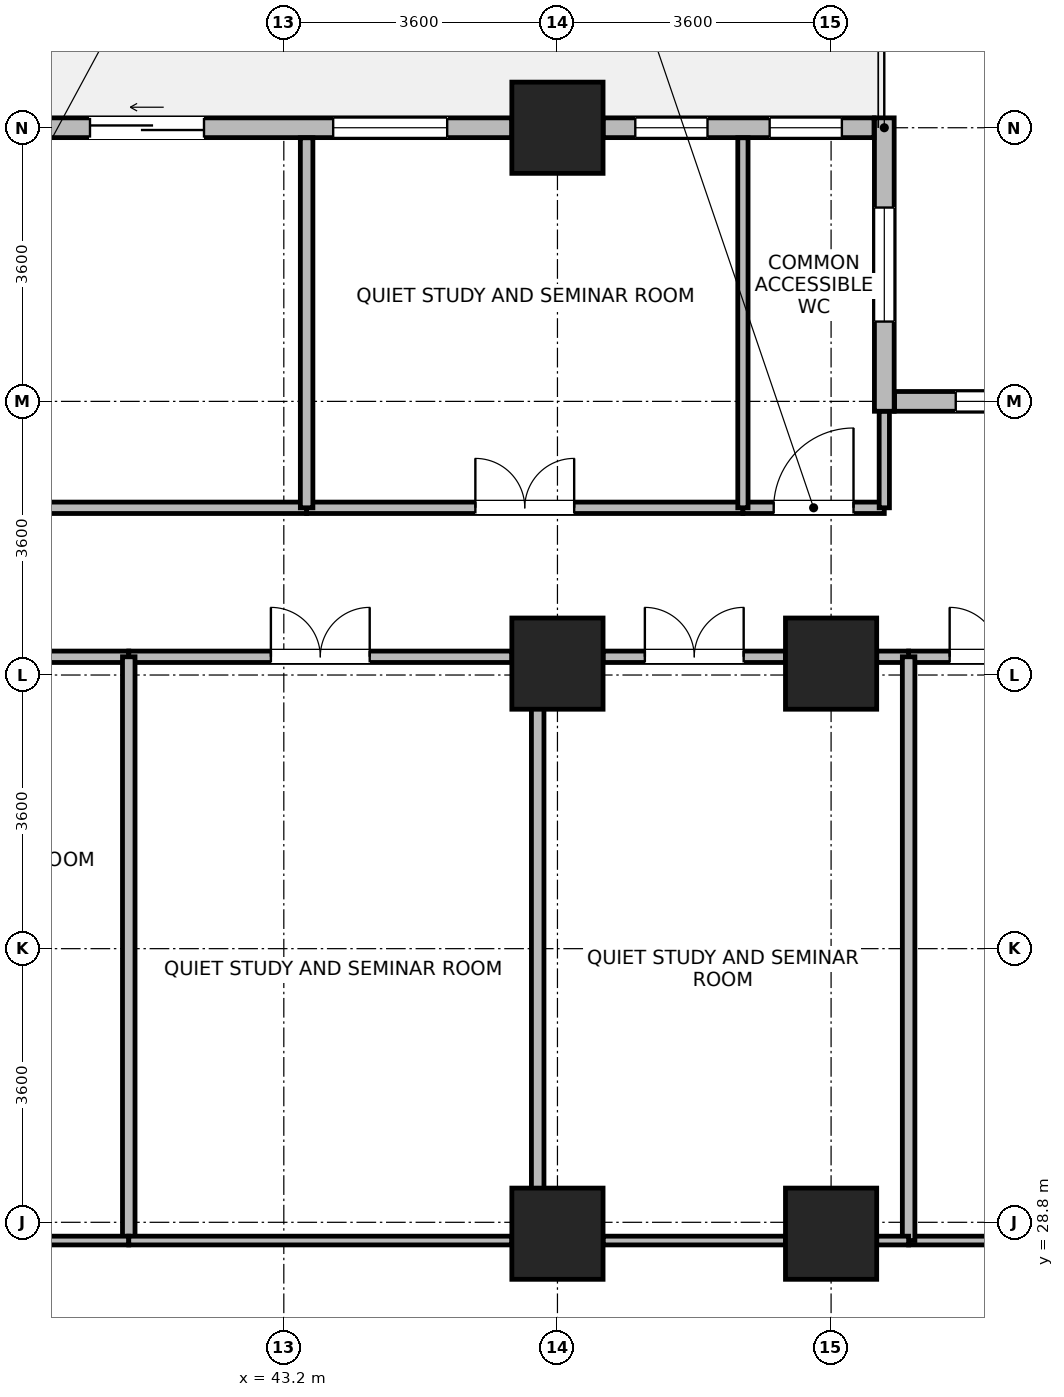
"""IFC4 building model, lengths in metres.
Left out: names, types, materials, properties, quantities, classifications, styles, units other than length and angle.
Written with IfcOpenShell. Run it as: python <this file> out.ifc"""

import sys

from ifc_helpers import new_model, si_unit, direction, frame, frame_2d, origin, origin_2d, place, context, subcontext, project, spatial, rectangle, extrude, source, transform, mapped, element, fill, save


model = new_model("IFC4")
c1 = context("Model", 3, precision=1e-05, world=origin(), true_north=direction((0.0, 1.0)))
c2 = subcontext(c1, "Body", "Model", "MODEL_VIEW")
j1 = project(units=[si_unit("LENGTHUNIT", "METRE"), si_unit("PLANEANGLEUNIT", "RADIAN")], contexts=[c1])
p1 = place(None, origin())
s1 = spatial("IfcSite", under=j1, at=p1, CompositionType="ELEMENT")
p2 = place(p1, origin())
s2 = spatial("IfcBuilding", under=s1, at=p2, CompositionType="ELEMENT")
p3 = place(p2, frame((0.0, 0.0, 115.6)))
s3 = spatial("IfcBuildingStorey", under=s2, at=p3, CompositionType="ELEMENT", Elevation=115.6)
m1 = source(origin(), c2, "Body", "SweptSolid", [
    extrude(rectangle(XDim=1.2, YDim=1.2, at=origin_2d()), origin(), (0.0, 0.0, 1.0), 3.7),
])
for number, where, z_axis, x_axis in (
    (1, (46.8, 28.65, 0.0), (0.0, 0.0, 1.0), (1.0, 0.0, 0.0)),
    (2, (46.8, 36.15, 0.0), (0.0, 0.0, 1.0), (1.0, 0.0, 0.0)),
    (3, (46.8, 43.2, 0.0), (0.0, 0.0, 1.0), (1.0, 0.0, 0.0)),
    (4, (50.4, 28.65, 0.0), (0.0, 0.0, 1.0), (1.0, 0.0, 0.0)),
    (5, (50.4, 36.15, 0.0), (0.0, 0.0, 1.0), (1.0, 0.0, 0.0)),
):
    element("IfcColumn", number, at=place(p3, frame(where, z_axis=z_axis, x_axis=x_axis)), inside=s3, PredefinedType="COLUMN", context=c2, shape_type="MappedRepresentation", body=[
        mapped(m1, transform((0.0, 0.0, 0.0), x_axis=(1.0, 0.0, 0.0), y_axis=(0.0, 1.0, 0.0), z_axis=(0.0, 0.0, 1.0), scale=1.0)),
    ])
p4 = place(p3, frame((51.235, 39.6, 0.0), z_axis=(0.0, 0.0, 1.0), x_axis=(1.0, 0.0, 0.0)))
e6 = element("IfcWall", 6, at=p4, inside=s3, PredefinedType="STANDARD", context=c2, shape_type="SweptSolid", body=[
    extrude(rectangle(XDim=9.33, YDim=0.26, at=frame_2d((4.665, 0.0))), origin(), (0.0, 0.0, 1.0), 3.43),
])
p5 = place(p4, frame((0.805, 0.0, 0.85)))
e7 = element("IfcOpeningElement", 7, at=p5, cuts=e6, PredefinedType="OPENING", context=c2, shape_type="SweptSolid", body=[
    extrude(rectangle(XDim=1.5, YDim=1.85, at=frame_2d((0.75, 0.925))), frame((0.0, 0.14, 0.0), z_axis=(0.0, -1.0, 0.0), x_axis=(1.0, 0.0, 0.0)), (0.0, 0.0, 1.0), 0.28),
])
p6 = place(p4, frame((3.915, 0.0, 0.85)))
e8 = element("IfcOpeningElement", 8, at=p6, cuts=e6, PredefinedType="OPENING", context=c2, shape_type="SweptSolid", body=[
    extrude(rectangle(XDim=1.5, YDim=1.85, at=frame_2d((0.75, 0.925))), frame((0.0, 0.14, 0.0), z_axis=(0.0, -1.0, 0.0), x_axis=(1.0, 0.0, 0.0)), (0.0, 0.0, 1.0), 0.28),
])
p7 = place(p4, frame((7.025, 0.0, 0.85)))
e9 = element("IfcOpeningElement", 9, at=p7, cuts=e6, PredefinedType="OPENING", context=c2, shape_type="SweptSolid", body=[
    extrude(rectangle(XDim=1.5, YDim=1.85, at=frame_2d((0.75, 0.925))), frame((0.0, 0.14, 0.0), z_axis=(0.0, -1.0, 0.0), x_axis=(1.0, 0.0, 0.0)), (0.0, 0.0, 1.0), 0.28),
])
p8 = place(p3, frame((51.1, 43.33, 0.0), z_axis=(0.0, 0.0, 1.0), x_axis=(0.0, -1.0, 0.0)))
e10 = element("IfcWall", 10, at=p8, inside=s3, PredefinedType="STANDARD", context=c2, shape_type="SweptSolid", body=[
    extrude(rectangle(XDim=3.86, YDim=0.26, at=frame_2d((1.93, 0.0))), origin(), (0.0, 0.0, 1.0), 3.43),
])
p9 = place(p8, frame((1.18, 0.0, 0.85)))
e11 = element("IfcOpeningElement", 11, at=p9, cuts=e10, PredefinedType="OPENING", context=c2, shape_type="SweptSolid", body=[
    extrude(rectangle(XDim=1.5, YDim=1.85, at=frame_2d((0.75, 0.925))), frame((0.0, 0.14, 0.0), z_axis=(0.0, -1.0, 0.0), x_axis=(1.0, 0.0, 0.0)), (0.0, 0.0, 1.0), 0.28),
])
p10 = place(p3, frame((47.401, 43.2, 0.0), z_axis=(0.0, 0.0, 1.0), x_axis=(1.0, 0.0, 0.0)))
e12 = element("IfcWall", 12, at=p10, inside=s3, PredefinedType="STANDARD", context=c2, shape_type="SweptSolid", body=[
    extrude(rectangle(XDim=3.564, YDim=0.26, at=frame_2d((1.782, 0.0))), origin(), (0.0, 0.0, 1.0), 3.43),
])
p11 = place(p10, frame((0.423, 0.0, 0.85)))
e13 = element("IfcOpeningElement", 13, at=p11, cuts=e12, PredefinedType="OPENING", context=c2, shape_type="SweptSolid", body=[
    extrude(rectangle(XDim=0.95, YDim=1.75, at=frame_2d((0.475, 0.875))), frame((0.0, 0.14, 0.0), z_axis=(0.0, -1.0, 0.0), x_axis=(1.0, 0.0, 0.0)), (0.0, 0.0, 1.0), 0.28),
])
p12 = place(p10, frame((2.191, 0.0, 0.85)))
e14 = element("IfcOpeningElement", 14, at=p12, cuts=e12, PredefinedType="OPENING", context=c2, shape_type="SweptSolid", body=[
    extrude(rectangle(XDim=0.95, YDim=1.75, at=frame_2d((0.475, 0.875))), frame((0.0, 0.14, 0.0), z_axis=(0.0, -1.0, 0.0), x_axis=(1.0, 0.0, 0.0)), (0.0, 0.0, 1.0), 0.28),
])
p13 = place(p3, frame((36.601, 43.2, 0.0), z_axis=(0.0, 0.0, 1.0), x_axis=(1.0, 0.0, 0.0)))
e15 = element("IfcWall", 15, at=p13, inside=s3, PredefinedType="STANDARD", context=c2, shape_type="SweptSolid", body=[
    extrude(rectangle(XDim=9.598, YDim=0.26, at=frame_2d((4.799, 0.0))), origin(), (0.0, 0.0, 1.0), 2.98),
])
p14 = place(p13, frame((4.049, 0.0, 0.0)))
e16 = element("IfcOpeningElement", 16, at=p14, cuts=e15, PredefinedType="OPENING", context=c2, shape_type="SweptSolid", body=[
    extrude(rectangle(XDim=1.5, YDim=2.15, at=frame_2d((0.75, 1.075))), frame((0.0, 0.14, 0.0), z_axis=(0.0, -1.0, 0.0), x_axis=(1.0, 0.0, 0.0)), (0.0, 0.0, 1.0), 0.28),
])
p15 = place(p13, frame((0.85, 0.0, 0.85)))
e17 = element("IfcOpeningElement", 17, at=p15, cuts=e15, PredefinedType="OPENING", context=c2, shape_type="SweptSolid", body=[
    extrude(rectangle(XDim=1.5, YDim=1.85, at=frame_2d((0.75, 0.925))), frame((0.0, 0.14, 0.0), z_axis=(0.0, -1.0, 0.0), x_axis=(1.0, 0.0, 0.0)), (0.0, 0.0, 1.0), 0.28),
])
p16 = place(p13, frame((7.248, 0.0, 0.85)))
e18 = element("IfcOpeningElement", 18, at=p16, cuts=e15, PredefinedType="OPENING", context=c2, shape_type="SweptSolid", body=[
    extrude(rectangle(XDim=1.5, YDim=1.85, at=frame_2d((0.75, 0.925))), frame((0.0, 0.14, 0.0), z_axis=(0.0, -1.0, 0.0), x_axis=(1.0, 0.0, 0.0)), (0.0, 0.0, 1.0), 0.28),
])
p17 = place(p3, frame((51.42, 36.24, 0.0), z_axis=(0.0, 0.0, 1.0), x_axis=(1.0, 0.0, 0.0)))
e19 = element("IfcWall", 19, at=p17, inside=s3, PredefinedType="PARTITIONING", context=c2, shape_type="SweptSolid", body=[
    extrude(rectangle(XDim=2.38, YDim=0.15, at=frame_2d((1.19, 0.0))), origin(), (0.0, 0.0, 1.0), 2.78),
])
p18 = place(p17, frame((0.54, 0.0, 0.0)))
e20 = element("IfcOpeningElement", 20, at=p18, cuts=e19, PredefinedType="OPENING", context=c2, shape_type="SweptSolid", body=[
    extrude(rectangle(XDim=1.3, YDim=2.12, at=frame_2d((0.65, 1.06))), frame((0.0, 0.085, 0.0), z_axis=(0.0, -1.0, 0.0), x_axis=(1.0, 0.0, 0.0)), (0.0, 0.0, 1.0), 0.17),
])
p19 = place(p3, frame((34.8, 38.2, 0.0), z_axis=(0.0, 0.0, 1.0), x_axis=(1.0, 0.0, 0.0)))
e21 = element("IfcWall", 21, at=p19, inside=s3, PredefinedType="PARTITIONING", context=c2, shape_type="SweptSolid", body=[
    extrude(rectangle(XDim=8.7, YDim=0.15, at=frame_2d((4.35, 0.0))), origin(), (0.0, 0.0, 1.0), 3.43),
])
p20 = place(p19, frame((3.9, 0.0, 0.0)))
e22 = element("IfcOpeningElement", 22, at=p20, cuts=e21, PredefinedType="OPENING", context=c2, shape_type="SweptSolid", body=[
    extrude(rectangle(XDim=0.9, YDim=2.08, at=frame_2d((0.45, 1.04))), frame((0.0, 0.085, 0.0), z_axis=(0.0, -1.0, 0.0), x_axis=(1.0, 0.0, 0.0)), (0.0, 0.0, 1.0), 0.17),
])
p21 = place(p3, frame((36.6, 36.24, 0.0), z_axis=(0.0, 0.0, 1.0), x_axis=(1.0, 0.0, 0.0)))
e23 = element("IfcWall", 23, at=p21, inside=s3, PredefinedType="PARTITIONING", context=c2, shape_type="SweptSolid", body=[
    extrude(rectangle(XDim=4.56, YDim=0.15, at=frame_2d((2.28, 0.0))), origin(), (0.0, 0.0, 1.0), 2.78),
])
p22 = place(p3, frame((43.5, 38.2, 0.0), z_axis=(0.0, 0.0, 1.0), x_axis=(1.0, 0.0, 0.0)))
e24 = element("IfcWall", 24, at=p22, inside=s3, PredefinedType="PARTITIONING", context=c2, shape_type="SweptSolid", body=[
    extrude(rectangle(XDim=5.74, YDim=0.15, at=frame_2d((2.87, 0.0))), origin(), (0.0, 0.0, 1.0), 3.43),
])
p23 = place(p22, frame((2.22, 0.0, 0.0)))
e25 = element("IfcOpeningElement", 25, at=p23, cuts=e24, PredefinedType="OPENING", context=c2, shape_type="SweptSolid", body=[
    extrude(rectangle(XDim=1.3, YDim=2.12, at=frame_2d((0.65, 1.06))), frame((0.0, 0.085, 0.0), z_axis=(0.0, -1.0, 0.0), x_axis=(1.0, 0.0, 0.0)), (0.0, 0.0, 1.0), 0.17),
])
p24 = place(p3, frame((41.16, 36.24, 0.0), z_axis=(0.0, 0.0, 1.0), x_axis=(1.0, 0.0, 0.0)))
e26 = element("IfcWall", 26, at=p24, inside=s3, PredefinedType="PARTITIONING", context=c2, shape_type="SweptSolid", body=[
    extrude(rectangle(XDim=5.04, YDim=0.15, at=frame_2d((2.52, 0.0))), origin(), (0.0, 0.0, 1.0), 2.78),
])
p25 = place(p24, frame((1.87, 0.0, 0.0)))
e27 = element("IfcOpeningElement", 27, at=p25, cuts=e26, PredefinedType="OPENING", context=c2, shape_type="SweptSolid", body=[
    extrude(rectangle(XDim=1.3, YDim=2.12, at=frame_2d((0.65, 1.06))), frame((0.0, 0.085, 0.0), z_axis=(0.0, -1.0, 0.0), x_axis=(1.0, 0.0, 0.0)), (0.0, 0.0, 1.0), 0.17),
])
p26 = place(p3, frame((47.4, 36.24, 0.0), z_axis=(0.0, 0.0, 1.0), x_axis=(1.0, 0.0, 0.0)))
e28 = element("IfcWall", 28, at=p26, inside=s3, PredefinedType="PARTITIONING", context=c2, shape_type="SweptSolid", body=[
    extrude(rectangle(XDim=2.4, YDim=0.15, at=frame_2d((1.2, 0.0))), origin(), (0.0, 0.0, 1.0), 2.78),
])
p27 = place(p26, frame((0.55, 0.0, 0.0)))
e29 = element("IfcOpeningElement", 29, at=p27, cuts=e28, PredefinedType="OPENING", context=c2, shape_type="SweptSolid", body=[
    extrude(rectangle(XDim=1.3, YDim=2.12, at=frame_2d((0.65, 1.06))), frame((0.0, 0.085, 0.0), z_axis=(0.0, -1.0, 0.0), x_axis=(1.0, 0.0, 0.0)), (0.0, 0.0, 1.0), 0.17),
])
p28 = place(p3, frame((51.0, 36.24, 0.0), z_axis=(0.0, 0.0, 1.0), x_axis=(1.0, 0.0, 0.0)))
e30 = element("IfcWall", 30, at=p28, inside=s3, PredefinedType="PARTITIONING", context=c2, shape_type="SweptSolid", body=[
    extrude(rectangle(XDim=0.42, YDim=0.15, at=frame_2d((0.21, 0.0))), origin(), (0.0, 0.0, 1.0), 2.78),
])
p29 = place(p3, frame((49.24, 38.2, 0.0), z_axis=(0.0, 0.0, 1.0), x_axis=(1.0, 0.0, 0.0)))
e31 = element("IfcWall", 31, at=p29, inside=s3, PredefinedType="PARTITIONING", context=c2, shape_type="SweptSolid", body=[
    extrude(rectangle(XDim=1.86, YDim=0.15, at=frame_2d((0.93, 0.0))), origin(), (0.0, 0.0, 1.0), 3.43),
])
p30 = place(p29, frame((0.405, 0.0, 0.0)))
e32 = element("IfcOpeningElement", 32, at=p30, cuts=e31, PredefinedType="OPENING", context=c2, shape_type="SweptSolid", body=[
    extrude(rectangle(XDim=1.05, YDim=2.12, at=frame_2d((0.525, 1.06))), frame((0.0, 0.085, 0.0), z_axis=(0.0, -1.0, 0.0), x_axis=(1.0, 0.0, 0.0)), (0.0, 0.0, 1.0), 0.17),
])
p31 = place(p3, frame((51.42, 28.56, 0.0), z_axis=(0.0, 0.0, 1.0), x_axis=(1.0, 0.0, 0.0)))
e33 = element("IfcWall", 33, at=p31, inside=s3, PredefinedType="PARTITIONING", context=c2, shape_type="SweptSolid", body=[
    extrude(rectangle(XDim=2.38, YDim=0.115, at=frame_2d((1.19, 0.0))), origin(), (0.0, 0.0, 1.0), 2.78),
])
for number, where, z_axis, x_axis in (
    (34, (41.16, 28.56, 0.0), (0.0, 0.0, 1.0), (0.0, 1.0, 0.0)),
    (35, (46.54, 28.56, 0.0), (0.0, 0.0, 1.0), (0.0, 1.0, 0.0)),
    (36, (51.42, 28.56, 0.0), (0.0, 0.0, 1.0), (0.0, 1.0, 0.0)),
):
    element("IfcWall", number, at=place(p3, frame(where, z_axis=z_axis, x_axis=x_axis)), inside=s3, PredefinedType="PARTITIONING", context=c2, shape_type="SweptSolid", body=[
        extrude(rectangle(XDim=7.68, YDim=0.165, at=frame_2d((3.84, 0.0))), origin(), (0.0, 0.0, 1.0), 3.43),
    ])
p32 = place(p3, frame((36.6, 28.56, 0.0), z_axis=(0.0, 0.0, 1.0), x_axis=(1.0, 0.0, 0.0)))
e37 = element("IfcWall", 37, at=p32, inside=s3, PredefinedType="PARTITIONING", context=c2, shape_type="SweptSolid", body=[
    extrude(rectangle(XDim=4.56, YDim=0.115, at=frame_2d((2.28, 0.0))), origin(), (0.0, 0.0, 1.0), 2.78),
])
p33 = place(p3, frame((41.16, 28.56, 0.0), z_axis=(0.0, 0.0, 1.0), x_axis=(1.0, 0.0, 0.0)))
e38 = element("IfcWall", 38, at=p33, inside=s3, PredefinedType="PARTITIONING", context=c2, shape_type="SweptSolid", body=[
    extrude(rectangle(XDim=5.04, YDim=0.115, at=frame_2d((2.52, 0.0))), origin(), (0.0, 0.0, 1.0), 2.78),
])
p34 = place(p3, frame((43.5, 38.2, 0.0), z_axis=(0.0, 0.0, 1.0), x_axis=(0.0, 1.0, 0.0)))
e39 = element("IfcWall", 39, at=p34, inside=s3, PredefinedType="PARTITIONING", context=c2, shape_type="SweptSolid", body=[
    extrude(rectangle(XDim=4.868, YDim=0.165, at=frame_2d((2.434, 0.0))), origin(), (0.0, 0.0, 1.0), 3.43),
])
p35 = place(p3, frame((49.24, 38.2, 0.0), z_axis=(0.0, 0.0, 1.0), x_axis=(0.0, 1.0, 0.0)))
e40 = element("IfcWall", 40, at=p35, inside=s3, PredefinedType="PARTITIONING", context=c2, shape_type="SweptSolid", body=[
    extrude(rectangle(XDim=4.868, YDim=0.135, at=frame_2d((2.434, 0.0))), origin(), (0.0, 0.0, 1.0), 3.43),
])
p36 = place(p3, frame((51.1, 38.2, 0.0), z_axis=(0.0, 0.0, 1.0), x_axis=(0.0, 1.0, 0.0)))
e41 = element("IfcWall", 41, at=p36, inside=s3, PredefinedType="PARTITIONING", context=c2, shape_type="SweptSolid", body=[
    extrude(rectangle(XDim=1.268, YDim=0.135, at=frame_2d((0.634, 0.0))), origin(), (0.0, 0.0, 1.0), 3.43),
])
p37 = place(p3, frame((47.4, 28.56, 0.0), z_axis=(0.0, 0.0, 1.0), x_axis=(1.0, 0.0, 0.0)))
e42 = element("IfcWall", 42, at=p37, inside=s3, PredefinedType="PARTITIONING", context=c2, shape_type="SweptSolid", body=[
    extrude(rectangle(XDim=2.4, YDim=0.115, at=frame_2d((1.2, 0.0))), origin(), (0.0, 0.0, 1.0), 2.78),
])
p38 = place(p3, frame((51.0, 28.56, 0.0), z_axis=(0.0, 0.0, 1.0), x_axis=(1.0, 0.0, 0.0)))
e43 = element("IfcWall", 43, at=p38, inside=s3, PredefinedType="PARTITIONING", context=c2, shape_type="SweptSolid", body=[
    extrude(rectangle(XDim=0.42, YDim=0.115, at=frame_2d((0.21, 0.0))), origin(), (0.0, 0.0, 1.0), 2.78),
])
p39 = place(p5, origin())
e44 = element("IfcWindow", 44, at=p39, inside=s3, PartitioningType="SINGLE_PANEL", PredefinedType="WINDOW", context=c2, shape_type="SweptSolid", body=[
    extrude(rectangle(XDim=1.5, YDim=1.85, at=frame_2d((0.75, 0.925))), frame((0.0, 0.03, 0.0), z_axis=(0.0, -1.0, 0.0), x_axis=(1.0, 0.0, 0.0)), (0.0, 0.0, 1.0), 0.06),
])
fill(e7, e44)
p40 = place(p9, origin())
e45 = element("IfcWindow", 45, at=p40, inside=s3, PartitioningType="SINGLE_PANEL", PredefinedType="WINDOW", context=c2, shape_type="SweptSolid", body=[
    extrude(rectangle(XDim=1.5, YDim=1.85, at=frame_2d((0.75, 0.925))), frame((0.0, 0.03, 0.0), z_axis=(0.0, -1.0, 0.0), x_axis=(1.0, 0.0, 0.0)), (0.0, 0.0, 1.0), 0.06),
])
fill(e11, e45)
p41 = place(p11, origin())
e46 = element("IfcWindow", 46, at=p41, inside=s3, PartitioningType="SINGLE_PANEL", PredefinedType="WINDOW", context=c2, shape_type="SweptSolid", body=[
    extrude(rectangle(XDim=0.95, YDim=1.75, at=frame_2d((0.475, 0.875))), frame((0.0, 0.03, 0.0), z_axis=(0.0, -1.0, 0.0), x_axis=(1.0, 0.0, 0.0)), (0.0, 0.0, 1.0), 0.06),
])
fill(e13, e46)
p42 = place(p12, origin())
e47 = element("IfcWindow", 47, at=p42, inside=s3, PartitioningType="SINGLE_PANEL", PredefinedType="WINDOW", context=c2, shape_type="SweptSolid", body=[
    extrude(rectangle(XDim=0.95, YDim=1.75, at=frame_2d((0.475, 0.875))), frame((0.0, 0.03, 0.0), z_axis=(0.0, -1.0, 0.0), x_axis=(1.0, 0.0, 0.0)), (0.0, 0.0, 1.0), 0.06),
])
fill(e14, e47)
p43 = place(p14, origin())
e48 = element("IfcDoor", 48, at=p43, inside=s3, OperationType="SLIDING_TO_LEFT", PredefinedType="DOOR", context=c2, shape_type="SweptSolid", body=[
    extrude(rectangle(XDim=1.5, YDim=2.15, at=frame_2d((0.75, 1.075))), frame((0.0, 0.025, 0.0), z_axis=(0.0, -1.0, 0.0), x_axis=(1.0, 0.0, 0.0)), (0.0, 0.0, 1.0), 0.05),
])
fill(e16, e48)
p44 = place(p16, origin())
e49 = element("IfcWindow", 49, at=p44, inside=s3, PartitioningType="SINGLE_PANEL", PredefinedType="WINDOW", context=c2, shape_type="SweptSolid", body=[
    extrude(rectangle(XDim=1.5, YDim=1.85, at=frame_2d((0.75, 0.925))), frame((0.0, 0.03, 0.0), z_axis=(0.0, -1.0, 0.0), x_axis=(1.0, 0.0, 0.0)), (0.0, 0.0, 1.0), 0.06),
])
fill(e18, e49)
p45 = place(p18, origin())
e50 = element("IfcDoor", 50, at=p45, inside=s3, OperationType="DOUBLE_DOOR_SINGLE_SWING", PredefinedType="DOOR", context=c2, shape_type="SweptSolid", body=[
    extrude(rectangle(XDim=1.3, YDim=2.12, at=frame_2d((0.65, 1.06))), frame((0.0, 0.025, 0.0), z_axis=(0.0, -1.0, 0.0), x_axis=(1.0, 0.0, 0.0)), (0.0, 0.0, 1.0), 0.05),
])
fill(e20, e50)
p46 = place(p23, origin())
e51 = element("IfcDoor", 51, at=p46, inside=s3, OperationType="DOUBLE_DOOR_SINGLE_SWING", PredefinedType="DOOR", context=c2, shape_type="SweptSolid", body=[
    extrude(rectangle(XDim=1.3, YDim=2.12, at=frame_2d((0.65, 1.06))), frame((0.0, 0.025, 0.0), z_axis=(0.0, -1.0, 0.0), x_axis=(1.0, 0.0, 0.0)), (0.0, 0.0, 1.0), 0.05),
])
fill(e25, e51)
p47 = place(p25, origin())
e52 = element("IfcDoor", 52, at=p47, inside=s3, OperationType="DOUBLE_DOOR_SINGLE_SWING", PredefinedType="DOOR", context=c2, shape_type="SweptSolid", body=[
    extrude(rectangle(XDim=1.3, YDim=2.12, at=frame_2d((0.65, 1.06))), frame((0.0, 0.025, 0.0), z_axis=(0.0, -1.0, 0.0), x_axis=(1.0, 0.0, 0.0)), (0.0, 0.0, 1.0), 0.05),
])
fill(e27, e52)
p48 = place(p27, origin())
e53 = element("IfcDoor", 53, at=p48, inside=s3, OperationType="DOUBLE_DOOR_SINGLE_SWING", PredefinedType="DOOR", context=c2, shape_type="SweptSolid", body=[
    extrude(rectangle(XDim=1.3, YDim=2.12, at=frame_2d((0.65, 1.06))), frame((0.0, 0.025, 0.0), z_axis=(0.0, -1.0, 0.0), x_axis=(1.0, 0.0, 0.0)), (0.0, 0.0, 1.0), 0.05),
])
fill(e29, e53)
p49 = place(p30, origin())
e54 = element("IfcDoor", 54, at=p49, inside=s3, OperationType="SINGLE_SWING_RIGHT", PredefinedType="DOOR", context=c2, shape_type="SweptSolid", body=[
    extrude(rectangle(XDim=1.05, YDim=2.12, at=frame_2d((0.525, 1.06))), frame((0.0, 0.025, 0.0), z_axis=(0.0, -1.0, 0.0), x_axis=(1.0, 0.0, 0.0)), (0.0, 0.0, 1.0), 0.05),
])
fill(e32, e54)
save(model, sys.argv[1])
